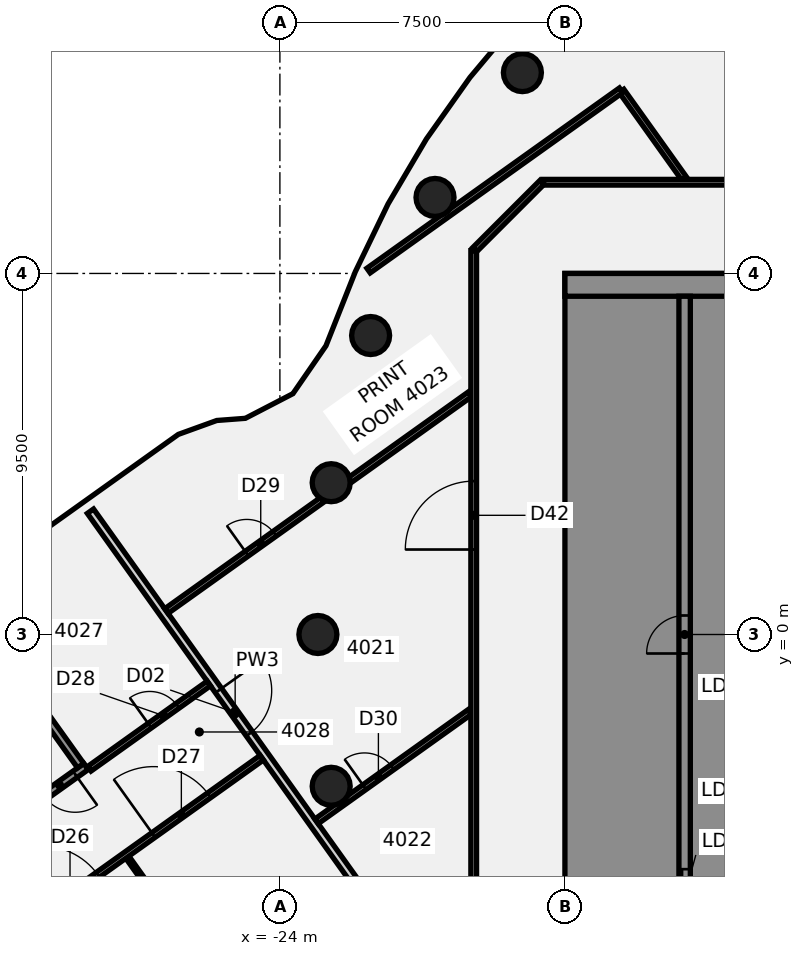
"""IFC4 building model, lengths in metres.
Left out: names, types, materials, properties, quantities, classifications, styles, units other than length and angle.
Written with IfcOpenShell. Run it as: python <this file> out.ifc"""

import sys

from ifc_helpers import new_model, si_unit, direction, frame, frame_2d, origin, origin_2d, place, context, subcontext, project, spatial, polyline, rectangle, circle, outline, extrude, element, fill, save


model = new_model("IFC4")
c1 = context("Model", 3, precision=1e-05, world=origin(), true_north=direction((0.0, 1.0)))
c2 = subcontext(c1, "Body", "Model", "MODEL_VIEW")
j1 = project(units=[si_unit("LENGTHUNIT", "METRE"), si_unit("PLANEANGLEUNIT", "RADIAN")], contexts=[c1])
p1 = place(None, origin())
s1 = spatial("IfcSite", under=j1, at=p1, CompositionType="ELEMENT")
p2 = place(p1, origin())
s2 = spatial("IfcBuilding", under=s1, at=p2, CompositionType="ELEMENT")
p3 = place(p2, frame((0.0, 0.0, 163.0)))
s3 = spatial("IfcBuildingStorey", under=s2, at=p3, CompositionType="ELEMENT", Elevation=163.0)
for number, where, z_axis, x_axis in (
    (1, (-17.619, 14.784, -0.14), (0.0, 0.0, 1.0), (1.0, 0.0, 0.0)),
    (2, (-19.919, 11.5, -0.14), (0.0, 0.0, 1.0), (1.0, 0.0, 0.0)),
    (3, (-21.613, 7.866, -0.14), (0.0, 0.0, 1.0), (1.0, 0.0, 0.0)),
    (4, (-22.651, 3.994, -0.14), (0.0, 0.0, 1.0), (1.0, 0.0, 0.0)),
    (5, (-23.0, 0.0, -0.14), (0.0, 0.0, 1.0), (1.0, 0.0, 0.0)),
    (6, (-22.651, -3.994, -0.14), (0.0, 0.0, 1.0), (1.0, 0.0, 0.0)),
):
    element("IfcColumn", number, at=place(p3, frame(where, z_axis=z_axis, x_axis=x_axis)), inside=s3, PredefinedType="COLUMN", context=c2, shape_type="SweptSolid", body=[
        extrude(circle(Radius=0.5, at=origin_2d()), origin(), (0.0, 0.0, 1.0), 3.75),
    ])
p4 = place(p3, frame((-28.985, 3.244, 0.0), z_axis=(0.0, 0.0, 1.0), x_axis=(0.581102498489, -0.813830379287, 0.0)))
e7 = element("IfcWall", 7, at=p4, inside=s3, PredefinedType="PARTITIONING", context=c2, shape_type="SweptSolid", body=[
    extrude(rectangle(XDim=13.106, YDim=0.2, at=frame_2d((6.553, 0.0))), origin(), (0.0, 0.0, 1.0), 3.01),
])
p5 = place(p4, frame((5.799, 0.0, 0.0)))
e8 = element("IfcOpeningElement", 8, at=p5, cuts=e7, PredefinedType="OPENING", context=c2, shape_type="SweptSolid", body=[
    extrude(rectangle(XDim=1.4, YDim=2.1, at=frame_2d((0.7, 1.05))), frame((0.0, 0.11, 0.0), z_axis=(0.0, -1.0, 0.0), x_axis=(1.0, 0.0, 0.0)), (0.0, 0.0, 1.0), 0.22),
])
p6 = place(p3, frame((-28.014, -5.86, 0.0), z_axis=(0.0, 0.0, 1.0), x_axis=(0.581026614331, -0.813884557808, 0.0)))
e9 = element("IfcWall", 9, at=p6, inside=s3, PredefinedType="PARTITIONING", context=c2, shape_type="SweptSolid", body=[
    extrude(rectangle(XDim=3.711, YDim=0.1, at=frame_2d((1.856, 0.0))), origin(), (0.0, 0.0, 1.0), 3.01),
])
p7 = place(p3, frame((-15.01, 14.304, 0.0), z_axis=(0.0, 0.0, 1.0), x_axis=(0.581123885817, -0.813815107585, 0.0)))
e10 = element("IfcWall", 10, at=p7, inside=s3, PredefinedType="PARTITIONING", context=c2, shape_type="SweptSolid", body=[
    extrude(rectangle(XDim=2.829, YDim=0.15, at=frame_2d((1.414, 0.0))), origin(), (0.0, 0.0, 1.0), 3.01),
])
p8 = place(p3, frame((-17.065, 11.9, 0.0), z_axis=(0.0, 0.0, 1.0), x_axis=(1.0, 0.0, 0.0)))
e11 = element("IfcWall", 11, at=p8, inside=s3, PredefinedType="PARTITIONING", context=c2, shape_type="SweptSolid", body=[
    extrude(rectangle(XDim=34.165, YDim=0.15, at=frame_2d((17.083, 0.0))), origin(), (0.0, 0.0, 1.0), 3.01),
])
p9 = place(p8, frame((22.648, 0.0, 0.0)))
e12 = element("IfcOpeningElement", 12, at=p9, cuts=e11, PredefinedType="OPENING", context=c2, shape_type="SweptSolid", body=[
    extrude(rectangle(XDim=1.8, YDim=2.1, at=frame_2d((0.9, 1.05))), frame((0.0, 0.085, 0.0), z_axis=(0.0, -1.0, 0.0), x_axis=(1.0, 0.0, 0.0)), (0.0, 0.0, 1.0), 0.17),
])
p10 = place(p8, frame((28.812, 0.0, 0.0)))
e13 = element("IfcOpeningElement", 13, at=p10, cuts=e11, PredefinedType="OPENING", context=c2, shape_type="SweptSolid", body=[
    extrude(rectangle(XDim=1.8, YDim=2.1, at=frame_2d((0.9, 1.05))), frame((0.0, 0.085, 0.0), z_axis=(0.0, -1.0, 0.0), x_axis=(1.0, 0.0, 0.0)), (0.0, 0.0, 1.0), 0.17),
])
p11 = place(p8, frame((8.421, 0.0, 0.0)))
e14 = element("IfcOpeningElement", 14, at=p11, cuts=e11, PredefinedType="OPENING", context=c2, shape_type="SweptSolid", body=[
    extrude(rectangle(XDim=1.8, YDim=2.1, at=frame_2d((0.9, 1.05))), frame((0.0, 0.085, 0.0), z_axis=(0.0, -1.0, 0.0), x_axis=(1.0, 0.0, 0.0)), (0.0, 0.0, 1.0), 0.17),
])
p12 = place(p3, frame((-31.655, -8.367, 0.0), z_axis=(0.0, 0.0, 1.0), x_axis=(0.813810154741, 0.581130821795, 0.0)))
e15 = element("IfcWall", 15, at=p12, inside=s3, PredefinedType="PARTITIONING", context=c2, shape_type="SweptSolid", body=[
    extrude(rectangle(XDim=8.819, YDim=0.15, at=frame_2d((4.41, 0.0))), origin(), (0.0, 0.0, 1.0), 3.01),
])
p13 = place(p12, frame((1.72, 0.0, 0.0)))
e16 = element("IfcOpeningElement", 16, at=p13, cuts=e15, PredefinedType="OPENING", context=c2, shape_type="SweptSolid", body=[
    extrude(rectangle(XDim=1.8, YDim=2.1, at=frame_2d((0.9, 1.05))), frame((0.0, 0.085, 0.0), z_axis=(0.0, -1.0, 0.0), x_axis=(1.0, 0.0, 0.0)), (0.0, 0.0, 1.0), 0.17),
])
p14 = place(p12, frame((5.32, 0.0, 0.0)))
e17 = element("IfcOpeningElement", 17, at=p14, cuts=e15, PredefinedType="OPENING", context=c2, shape_type="SweptSolid", body=[
    extrude(rectangle(XDim=1.8, YDim=2.1, at=frame_2d((0.9, 1.05))), frame((0.0, 0.085, 0.0), z_axis=(0.0, -1.0, 0.0), x_axis=(1.0, 0.0, 0.0)), (0.0, 0.0, 1.0), 0.17),
])
p15 = place(p3, frame((-29.013, -3.532, 0.0), z_axis=(0.0, 0.0, 1.0), x_axis=(0.813844572134, 0.581082620983, 0.0)))
e18 = element("IfcWall", 18, at=p15, inside=s3, PredefinedType="PARTITIONING", context=c2, shape_type="SweptSolid", body=[
    extrude(rectangle(XDim=3.86, YDim=0.15, at=frame_2d((1.93, 0.0))), origin(), (0.0, 0.0, 1.0), 3.01),
])
p16 = place(p15, frame((1.95, 0.0, 0.0)))
e19 = element("IfcOpeningElement", 19, at=p16, cuts=e18, PredefinedType="OPENING", context=c2, shape_type="SweptSolid", body=[
    extrude(rectangle(XDim=0.9, YDim=2.1, at=frame_2d((0.45, 1.05))), frame((0.0, 0.085, 0.0), z_axis=(0.0, -1.0, 0.0), x_axis=(1.0, 0.0, 0.0)), (0.0, 0.0, 1.0), 0.17),
])
p17 = place(p3, frame((-26.987, 0.617, 0.0), z_axis=(0.0, 0.0, 1.0), x_axis=(0.81386107039, 0.581059513392, 0.0)))
e20 = element("IfcWall", 20, at=p17, inside=s3, PredefinedType="PARTITIONING", context=c2, shape_type="SweptSolid", body=[
    extrude(rectangle(XDim=5.041, YDim=0.15, at=frame_2d((2.521, 0.0))), origin(), (0.0, 0.0, 1.0), 3.01),
])
p18 = place(p17, frame((2.6, 0.0, 0.0)))
e21 = element("IfcOpeningElement", 21, at=p18, cuts=e20, PredefinedType="OPENING", context=c2, shape_type="SweptSolid", body=[
    extrude(rectangle(XDim=0.9, YDim=2.1, at=frame_2d((0.45, 1.05))), frame((0.0, 0.085, 0.0), z_axis=(0.0, -1.0, 0.0), x_axis=(1.0, 0.0, 0.0)), (0.0, 0.0, 1.0), 0.17),
])
p19 = place(p3, frame((-22.159, 4.064, 0.0), z_axis=(0.0, 0.0, 1.0), x_axis=(0.813818497272, 0.581119138816, 0.0)))
e22 = element("IfcWall", 22, at=p19, inside=s3, PredefinedType="PARTITIONING", context=c2, shape_type="SweptSolid", body=[
    extrude(rectangle(XDim=3.88, YDim=0.15, at=frame_2d((1.94, 0.0))), origin(), (0.0, 0.0, 1.0), 3.01),
])
p20 = place(p3, frame((-23.036, -4.917, 0.0), z_axis=(0.0, 0.0, 1.0), x_axis=(0.813829971932, 0.581103068986, 0.0)))
e23 = element("IfcWall", 23, at=p20, inside=s3, PredefinedType="PARTITIONING", context=c2, shape_type="SweptSolid", body=[
    extrude(rectangle(XDim=4.957, YDim=0.15, at=frame_2d((2.479, 0.0))), origin(), (0.0, 0.0, 1.0), 3.01),
])
p21 = place(p20, frame((1.55, 0.0, 0.0)))
e24 = element("IfcOpeningElement", 24, at=p21, cuts=e23, PredefinedType="OPENING", context=c2, shape_type="SweptSolid", body=[
    extrude(rectangle(XDim=0.9, YDim=2.1, at=frame_2d((0.45, 1.05))), frame((0.0, 0.085, 0.0), z_axis=(0.0, -1.0, 0.0), x_axis=(1.0, 0.0, 0.0)), (0.0, 0.0, 1.0), 0.17),
])
p22 = place(p3, frame((-21.667, 9.575, 0.0), z_axis=(0.0, 0.0, 1.0), x_axis=(0.813848610714, 0.581076964643, 0.0)))
e25 = element("IfcWall", 25, at=p22, inside=s3, PredefinedType="PARTITIONING", context=c2, shape_type="SweptSolid", body=[
    extrude(rectangle(XDim=8.165, YDim=0.15, at=frame_2d((4.083, 0.0))), origin(), (0.0, 0.0, 1.0), 3.01),
])
p23 = place(p3, frame((-18.872, 10.128, 0.0), z_axis=(0.0, 0.0, 1.0), x_axis=(0.707106781187, 0.707106781187, 0.0)))
e26 = element("IfcWall", 26, at=p23, inside=s3, PredefinedType="PARTITIONING", context=c2, shape_type="SweptSolid", body=[
    extrude(rectangle(XDim=2.505, YDim=0.15, at=frame_2d((1.253, 0.0))), origin(), (0.0, 0.0, 1.0), 3.01),
])
p24 = place(p3, frame((-18.9, -10.1, 0.0), z_axis=(0.0, 0.0, 1.0), x_axis=(0.0, 1.0, 0.0)))
e27 = element("IfcWall", 27, at=p24, inside=s3, PredefinedType="PARTITIONING", context=c2, shape_type="SweptSolid", body=[
    extrude(rectangle(XDim=20.2, YDim=0.15, at=frame_2d((10.1, 0.0))), origin(), (0.0, 0.0, 1.0), 3.01),
])
p25 = place(p24, frame((12.336, 0.0, 0.0)))
e28 = element("IfcOpeningElement", 28, at=p25, cuts=e27, PredefinedType="OPENING", context=c2, shape_type="SweptSolid", body=[
    extrude(rectangle(XDim=1.8, YDim=2.1, at=frame_2d((0.9, 1.05))), frame((0.0, 0.085, 0.0), z_axis=(0.0, -1.0, 0.0), x_axis=(1.0, 0.0, 0.0)), (0.0, 0.0, 1.0), 0.17),
])
p26 = place(p3, origin())
e29 = element("IfcWall", 29, at=p26, inside=s3, PredefinedType="SHEAR", context=c2, shape_type="SweptSolid", body=[
    extrude(outline(polyline([(-13.5, -8.125), (-15.9, -8.125), (-15.9, -5.625), (-13.5, -5.625), (-13.5, -5.375), (-15.9, -5.375), (-15.9, 5.375), (-13.5, 5.375), (-13.5, 5.625), (-15.9, 5.625), (-15.9, 8.125), (-13.5, 8.125), (-13.5, 8.9), (-15.9, 8.9), (-16.5, 8.9), (-16.5, -8.9), (-15.9, -8.9), (-13.5, -8.9), (-13.5, -8.125)])), origin(), (0.0, 0.0, 1.0), 3.61),
])
p27 = place(p3, frame((-16.5, 9.2, 0.0), z_axis=(0.0, 0.0, 1.0), x_axis=(1.0, 0.0, 0.0)))
e30 = element("IfcWall", 30, at=p27, inside=s3, PredefinedType="SHEAR", context=c2, shape_type="SweptSolid", body=[
    extrude(rectangle(XDim=13.0, YDim=0.6, at=frame_2d((6.5, 0.0))), origin(), (0.0, 0.0, 1.0), 3.61),
])
p28 = place(p3, frame((-13.35, -8.9, 0.0), z_axis=(0.0, 0.0, 1.0), x_axis=(0.0, 1.0, 0.0)))
e31 = element("IfcWall", 31, at=p28, inside=s3, PredefinedType="SHEAR", context=c2, shape_type="SweptSolid", body=[
    extrude(rectangle(XDim=17.8, YDim=0.3, at=frame_2d((8.9, 0.0))), origin(), (0.0, 0.0, 1.0), 3.61),
])
p29 = place(p28, frame((1.325, 0.0, 0.0)))
e32 = element("IfcOpeningElement", 32, at=p29, cuts=e31, PredefinedType="OPENING", context=c2, shape_type="SweptSolid", body=[
    extrude(rectangle(XDim=1.4, YDim=2.1, at=frame_2d((0.7, 1.05))), frame((0.0, 0.16, 0.0), z_axis=(0.0, -1.0, 0.0), x_axis=(1.0, 0.0, 0.0)), (0.0, 0.0, 1.0), 0.32),
])
p30 = place(p28, frame((8.4, 0.0, 0.0)))
e33 = element("IfcOpeningElement", 33, at=p30, cuts=e31, PredefinedType="OPENING", context=c2, shape_type="SweptSolid", body=[
    extrude(rectangle(XDim=1.0, YDim=2.1, at=frame_2d((0.5, 1.05))), frame((0.0, 0.16, 0.0), z_axis=(0.0, -1.0, 0.0), x_axis=(1.0, 0.0, 0.0)), (0.0, 0.0, 1.0), 0.32),
])
p31 = place(p3, frame((-29.104, -3.474, -0.14), z_axis=(0.0, 0.0, 1.0), x_axis=(-0.813893474933, -0.58101412329, 0.0)))
e34 = element("IfcWall", 34, at=p31, inside=s3, PredefinedType="SHEAR", context=c2, shape_type="SweptSolid", body=[
    extrude(rectangle(XDim=6.7, YDim=0.2, at=frame_2d((3.35, 0.0))), origin(), (0.0, 0.0, 1.0), 3.15),
])
p32 = place(p31, frame((0.35, 0.0, 0.0)))
e35 = element("IfcOpeningElement", 35, at=p32, cuts=e34, PredefinedType="OPENING", context=c2, shape_type="SweptSolid", body=[
    extrude(rectangle(XDim=1.0, YDim=2.1, at=frame_2d((0.5, 1.05))), frame((0.0, 0.11, 0.0), z_axis=(0.0, -1.0, 0.0), x_axis=(1.0, 0.0, 0.0)), (0.0, 0.0, 1.0), 0.22),
])
p33 = place(p3, frame((-31.102, -0.846, -0.14), z_axis=(0.0, 0.0, 1.0), x_axis=(0.580985567777, -0.8139138591, 0.0)))
e36 = element("IfcWall", 36, at=p33, inside=s3, PredefinedType="SHEAR", context=c2, shape_type="SweptSolid", body=[
    extrude(rectangle(XDim=3.2, YDim=0.2, at=frame_2d((1.6, 0.0))), origin(), (0.0, 0.0, 1.0), 3.15),
])
p34 = place(p5, origin())
e37 = element("IfcDoor", 37, at=p34, inside=s3, OperationType="DOUBLE_DOOR_SINGLE_SWING", PredefinedType="DOOR", context=c2, shape_type="SweptSolid", body=[
    extrude(rectangle(XDim=1.4, YDim=2.1, at=frame_2d((0.7, 1.05))), frame((0.0, 0.025, 0.0), z_axis=(0.0, -1.0, 0.0), x_axis=(1.0, 0.0, 0.0)), (0.0, 0.0, 1.0), 0.05),
])
fill(e8, e37)
p35 = place(p13, frame((1.8, 0.0, 0.0), z_axis=(0.0, 0.0, 1.0), x_axis=(-1.0, 0.0, 0.0)))
e38 = element("IfcDoor", 38, at=p35, inside=s3, OperationType="DOUBLE_DOOR_SINGLE_SWING", PredefinedType="DOOR", context=c2, shape_type="SweptSolid", body=[
    extrude(rectangle(XDim=1.8, YDim=2.1, at=frame_2d((0.9, 1.05))), frame((0.0, 0.025, 0.0), z_axis=(0.0, -1.0, 0.0), x_axis=(1.0, 0.0, 0.0)), (0.0, 0.0, 1.0), 0.05),
])
fill(e16, e38)
p36 = place(p14, frame((1.8, 0.0, 0.0), z_axis=(0.0, 0.0, 1.0), x_axis=(-1.0, 0.0, 0.0)))
e39 = element("IfcDoor", 39, at=p36, inside=s3, OperationType="DOUBLE_DOOR_SINGLE_SWING", PredefinedType="DOOR", context=c2, shape_type="SweptSolid", body=[
    extrude(rectangle(XDim=1.8, YDim=2.1, at=frame_2d((0.9, 1.05))), frame((0.0, 0.025, 0.0), z_axis=(0.0, -1.0, 0.0), x_axis=(1.0, 0.0, 0.0)), (0.0, 0.0, 1.0), 0.05),
])
fill(e17, e39)
p37 = place(p16, origin())
e40 = element("IfcDoor", 40, at=p37, inside=s3, OperationType="SINGLE_SWING_LEFT", PredefinedType="DOOR", context=c2, shape_type="SweptSolid", body=[
    extrude(rectangle(XDim=0.9, YDim=2.1, at=frame_2d((0.45, 1.05))), frame((0.0, 0.025, 0.0), z_axis=(0.0, -1.0, 0.0), x_axis=(1.0, 0.0, 0.0)), (0.0, 0.0, 1.0), 0.05),
])
fill(e19, e40)
p38 = place(p18, origin())
e41 = element("IfcDoor", 41, at=p38, inside=s3, OperationType="SINGLE_SWING_LEFT", PredefinedType="DOOR", context=c2, shape_type="SweptSolid", body=[
    extrude(rectangle(XDim=0.9, YDim=2.1, at=frame_2d((0.45, 1.05))), frame((0.0, 0.025, 0.0), z_axis=(0.0, -1.0, 0.0), x_axis=(1.0, 0.0, 0.0)), (0.0, 0.0, 1.0), 0.05),
])
fill(e21, e41)
p39 = place(p21, frame((0.9, 0.0, 0.0), z_axis=(0.0, 0.0, 1.0), x_axis=(-1.0, 0.0, 0.0)))
e42 = element("IfcDoor", 42, at=p39, inside=s3, OperationType="SINGLE_SWING_LEFT", PredefinedType="DOOR", context=c2, shape_type="SweptSolid", body=[
    extrude(rectangle(XDim=0.9, YDim=2.1, at=frame_2d((0.45, 1.05))), frame((0.0, 0.025, 0.0), z_axis=(0.0, -1.0, 0.0), x_axis=(1.0, 0.0, 0.0)), (0.0, 0.0, 1.0), 0.05),
])
fill(e24, e42)
p40 = place(p25, frame((1.8, 0.0, 0.0), z_axis=(0.0, 0.0, 1.0), x_axis=(-1.0, 0.0, 0.0)))
e43 = element("IfcDoor", 43, at=p40, inside=s3, OperationType="DOUBLE_DOOR_SINGLE_SWING", PredefinedType="DOOR", context=c2, shape_type="SweptSolid", body=[
    extrude(rectangle(XDim=1.8, YDim=2.1, at=frame_2d((0.9, 1.05))), frame((0.0, 0.025, 0.0), z_axis=(0.0, -1.0, 0.0), x_axis=(1.0, 0.0, 0.0)), (0.0, 0.0, 1.0), 0.05),
])
fill(e28, e43)
p41 = place(p29, origin())
e44 = element("IfcDoor", 44, at=p41, inside=s3, OperationType="SLIDING_TO_LEFT", PredefinedType="DOOR", context=c2, shape_type="SweptSolid", body=[
    extrude(rectangle(XDim=1.4, YDim=2.1, at=frame_2d((0.7, 1.05))), frame((0.0, 0.025, 0.0), z_axis=(0.0, -1.0, 0.0), x_axis=(1.0, 0.0, 0.0)), (0.0, 0.0, 1.0), 0.05),
])
fill(e32, e44)
p42 = place(p30, origin())
e45 = element("IfcDoor", 45, at=p42, inside=s3, OperationType="SINGLE_SWING_LEFT", PredefinedType="DOOR", context=c2, shape_type="SweptSolid", body=[
    extrude(rectangle(XDim=1.0, YDim=2.1, at=frame_2d((0.5, 1.05))), frame((0.0, 0.025, 0.0), z_axis=(0.0, -1.0, 0.0), x_axis=(1.0, 0.0, 0.0)), (0.0, 0.0, 1.0), 0.05),
])
fill(e33, e45)
p43 = place(p32, origin())
e46 = element("IfcDoor", 46, at=p43, inside=s3, OperationType="SINGLE_SWING_LEFT", PredefinedType="DOOR", context=c2, shape_type="SweptSolid", body=[
    extrude(rectangle(XDim=1.0, YDim=2.1, at=frame_2d((0.5, 1.05))), frame((0.0, 0.025, 0.0), z_axis=(0.0, -1.0, 0.0), x_axis=(1.0, 0.0, 0.0)), (0.0, 0.0, 1.0), 0.05),
])
fill(e35, e46)
save(model, sys.argv[1])
